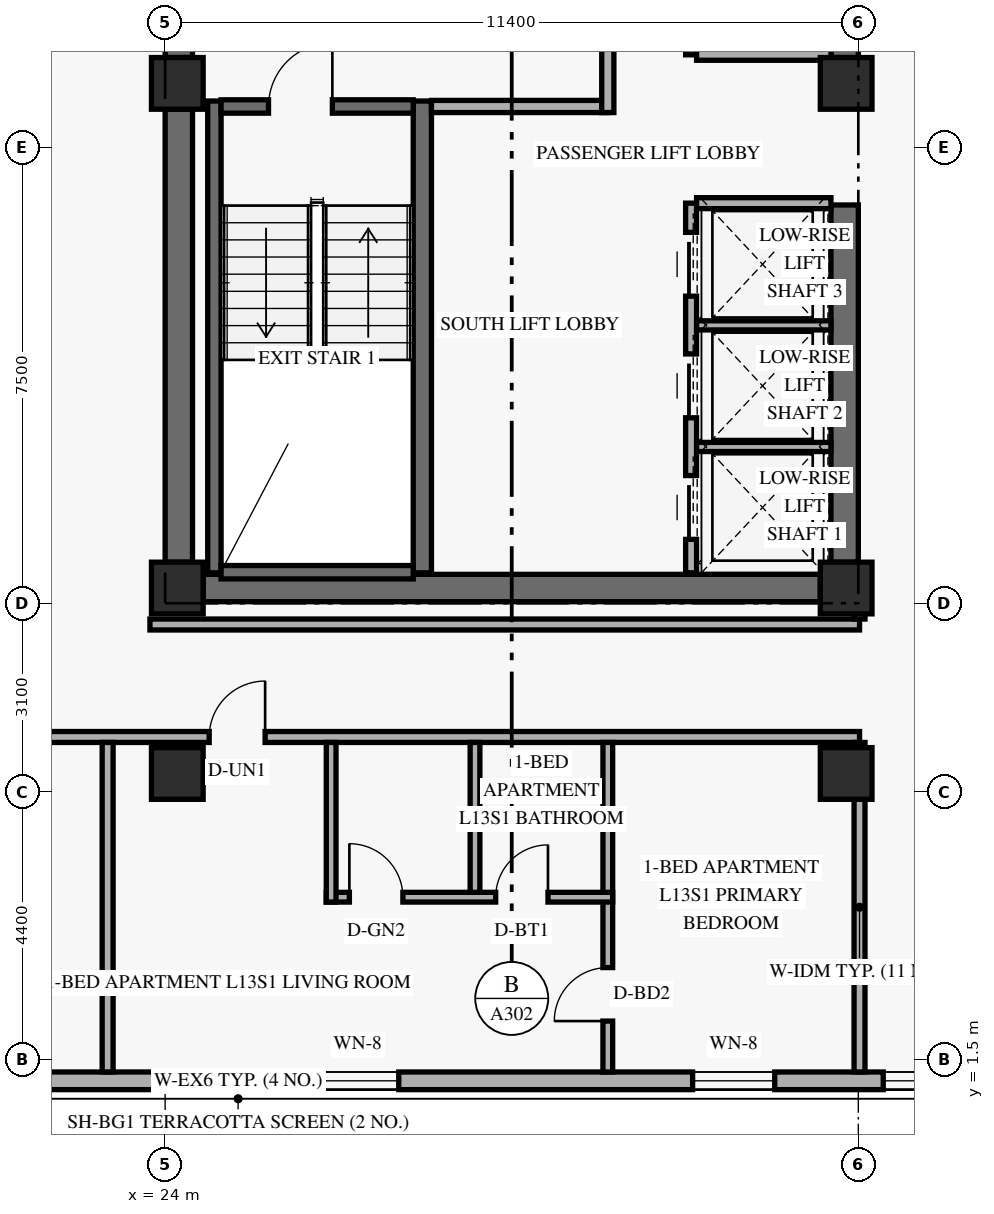
"""IFC4 building model, lengths in metres.
Left out: names, types, materials, properties, quantities, classifications, styles, units other than length and angle.
Written with IfcOpenShell. Run it as: python <this file> out.ifc"""

import sys

from ifc_helpers import new_model, si_unit, direction, frame, frame_2d, origin, origin_2d, place, context, subcontext, project, spatial, rectangle, extrude, element, fill, save


model = new_model("IFC4")
c1 = context("Model", 3, precision=1e-05, world=origin(), true_north=direction((0.0, 1.0)))
c2 = subcontext(c1, "Body", "Model", "MODEL_VIEW")
j1 = project(units=[si_unit("LENGTHUNIT", "METRE"), si_unit("PLANEANGLEUNIT", "RADIAN")], contexts=[c1])
p1 = place(None, origin())
s1 = spatial("IfcSite", under=j1, at=p1, CompositionType="ELEMENT")
p2 = place(p1, origin())
s2 = spatial("IfcBuilding", under=s1, at=p2, CompositionType="ELEMENT")
p3 = place(p2, frame((0.0, 0.0, 52.8)))
s3 = spatial("IfcBuildingStorey", under=s2, at=p3, CompositionType="ELEMENT", Elevation=52.8)
p4 = place(p3, frame((24.225, 9.675, 0.0), z_axis=(0.0, 0.0, 1.0), x_axis=(0.0, 1.0, 0.0)))
e1 = element("IfcWall", 1, at=p4, inside=s3, PredefinedType="SHEAR", context=c2, shape_type="SweptSolid", body=[
    extrude(rectangle(XDim=7.45, YDim=0.45, at=frame_2d((3.725, 0.0))), origin(), (0.0, 0.0, 1.0), 2.667),
])
p5 = place(p3, frame((24.225, 17.975, 0.0), z_axis=(0.0, 0.0, 1.0), x_axis=(0.0, 1.0, 0.0)))
e2 = element("IfcWall", 2, at=p5, inside=s3, PredefinedType="SHEAR", context=c2, shape_type="SweptSolid", body=[
    extrude(rectangle(XDim=11.8, YDim=0.45, at=frame_2d((5.9, 0.0))), origin(), (0.0, 0.0, 1.0), 2.667),
])
p6 = place(p3, frame((35.175, 9.675, 0.0), z_axis=(0.0, 0.0, 1.0), x_axis=(0.0, 1.0, 0.0)))
e3 = element("IfcWall", 3, at=p6, inside=s3, PredefinedType="SHEAR", context=c2, shape_type="SweptSolid", body=[
    extrude(rectangle(XDim=5.875, YDim=0.45, at=frame_2d((2.938, 0.0))), origin(), (0.0, 0.0, 1.0), 2.667),
])
p7 = place(p3, frame((35.175, 17.975, 0.0), z_axis=(0.0, 0.0, 1.0), x_axis=(0.0, 1.0, 0.0)))
e4 = element("IfcWall", 4, at=p7, inside=s3, PredefinedType="SHEAR", context=c2, shape_type="SweptSolid", body=[
    extrude(rectangle(XDim=10.125, YDim=0.45, at=frame_2d((5.062, 0.0))), origin(), (0.0, 0.0, 1.0), 2.667),
])
p8 = place(p3, frame((24.625, 9.25, 0.0), z_axis=(0.0, 0.0, 1.0), x_axis=(1.0, 0.0, 0.0)))
e5 = element("IfcWall", 5, at=p8, inside=s3, PredefinedType="SHEAR", context=c2, shape_type="SweptSolid", body=[
    extrude(rectangle(XDim=10.15, YDim=0.45, at=frame_2d((5.075, 0.0))), origin(), (0.0, 0.0, 1.0), 3.36),
])
p9 = place(p3, frame((24.81, 9.5, 0.0), z_axis=(0.0, 0.0, 1.0), x_axis=(0.0, 1.0, 0.0)))
e6 = element("IfcWall", 6, at=p9, inside=s3, PredefinedType="SHEAR", context=c2, shape_type="SweptSolid", body=[
    extrude(rectangle(XDim=7.76, YDim=0.22, at=frame_2d((3.88, 0.0))), origin(), (0.0, 0.0, 1.0), 3.36),
])
p10 = place(p3, frame((28.23, 9.5, 0.0), z_axis=(0.0, 0.0, 1.0), x_axis=(0.0, 1.0, 0.0)))
e7 = element("IfcWall", 7, at=p10, inside=s3, PredefinedType="SHEAR", context=c2, shape_type="SweptSolid", body=[
    extrude(rectangle(XDim=7.76, YDim=0.3, at=frame_2d((3.88, 0.0))), origin(), (0.0, 0.0, 1.0), 3.36),
])
p11 = place(p3, frame((24.92, 9.51, 0.0), z_axis=(0.0, 0.0, 1.0), x_axis=(1.0, 0.0, 0.0)))
e8 = element("IfcWall", 8, at=p11, inside=s3, PredefinedType="SHEAR", context=c2, shape_type="SweptSolid", body=[
    extrude(rectangle(XDim=3.16, YDim=0.22, at=frame_2d((1.58, 0.0))), origin(), (0.0, 0.0, 1.0), 3.36),
])
p12 = place(p3, frame((24.92, 17.17, 0.0), z_axis=(0.0, 0.0, 1.0), x_axis=(1.0, 0.0, 0.0)))
e9 = element("IfcWall", 9, at=p12, inside=s3, PredefinedType="SHEAR", context=c2, shape_type="SweptSolid", body=[
    extrude(rectangle(XDim=3.16, YDim=0.22, at=frame_2d((1.58, 0.0))), origin(), (0.0, 0.0, 1.0), 3.36),
])
p13 = place(p12, frame((0.78, 0.0, 0.0)))
e10 = element("IfcOpeningElement", 10, at=p13, cuts=e9, PredefinedType="OPENING", context=c2, shape_type="SweptSolid", body=[
    extrude(rectangle(XDim=1.05, YDim=2.15, at=frame_2d((0.525, 1.075))), frame((0.0, 0.12, 0.0), z_axis=(0.0, -1.0, 0.0), x_axis=(1.0, 0.0, 0.0)), (0.0, 0.0, 1.0), 0.24),
])
for number, where, z_axis, x_axis in (
    (11, (24.2, 6.2, 0.0), (0.0, 0.0, 1.0), (1.0, 0.0, 0.0)),
    (12, (24.2, 9.25, 0.0), (0.0, 0.0, 1.0), (1.0, 0.0, 0.0)),
    (13, (24.2, 17.55, 0.0), (0.0, 0.0, 1.0), (1.0, 0.0, 0.0)),
    (14, (35.2, 6.2, 0.0), (0.0, 0.0, 1.0), (1.0, 0.0, 0.0)),
    (15, (35.2, 9.25, 0.0), (0.0, 0.0, 1.0), (1.0, 0.0, 0.0)),
    (16, (35.2, 17.55, 0.0), (0.0, 0.0, 1.0), (1.0, 0.0, 0.0)),
):
    element("IfcColumn", number, at=place(p3, frame(where, z_axis=z_axis, x_axis=x_axis)), inside=s3, PredefinedType="COLUMN", context=c2, shape_type="SweptSolid", body=[
        extrude(rectangle(XDim=0.85, YDim=0.85, at=origin_2d()), origin(), (0.0, 0.0, 1.0), 3.6),
    ])
p14 = place(p3, frame((5.42, 1.145, 0.0), z_axis=(0.0, 0.0, 1.0), x_axis=(1.0, 0.0, 0.0)))
e17 = element("IfcWall", 17, at=p14, inside=s3, PredefinedType="SOLIDWALL", context=c2, shape_type="SweptSolid", body=[
    extrude(rectangle(XDim=39.56, YDim=0.29, at=frame_2d((19.78, 0.0))), origin(), (0.0, 0.0, 1.0), 3.36),
])
p15 = place(p14, frame((2.765, 0.0, 0.85)))
e18 = element("IfcOpeningElement", 18, at=p15, cuts=e17, PredefinedType="OPENING", context=c2, shape_type="SweptSolid", body=[
    extrude(rectangle(XDim=1.35, YDim=1.55, at=frame_2d((0.675, 0.775))), frame((0.0, 0.155, 0.0), z_axis=(0.0, -1.0, 0.0), x_axis=(1.0, 0.0, 0.0)), (0.0, 0.0, 1.0), 0.31),
])
p16 = place(p14, frame((7.18, 0.0, 0.85)))
e19 = element("IfcOpeningElement", 19, at=p16, cuts=e17, PredefinedType="OPENING", context=c2, shape_type="SweptSolid", body=[
    extrude(rectangle(XDim=1.2, YDim=1.5, at=frame_2d((0.6, 0.75))), frame((0.0, 0.155, 0.0), z_axis=(0.0, -1.0, 0.0), x_axis=(1.0, 0.0, 0.0)), (0.0, 0.0, 1.0), 0.31),
])
p17 = place(p14, frame((12.482, 0.0, 0.85)))
e20 = element("IfcOpeningElement", 20, at=p17, cuts=e17, PredefinedType="OPENING", context=c2, shape_type="SweptSolid", body=[
    extrude(rectangle(XDim=1.35, YDim=1.55, at=frame_2d((0.675, 0.775))), frame((0.0, 0.155, 0.0), z_axis=(0.0, -1.0, 0.0), x_axis=(1.0, 0.0, 0.0)), (0.0, 0.0, 1.0), 0.31),
])
p18 = place(p14, frame((21.072, 0.0, 0.85)))
e21 = element("IfcOpeningElement", 21, at=p18, cuts=e17, PredefinedType="OPENING", context=c2, shape_type="SweptSolid", body=[
    extrude(rectangle(XDim=1.35, YDim=1.55, at=frame_2d((0.675, 0.775))), frame((0.0, 0.155, 0.0), z_axis=(0.0, -1.0, 0.0), x_axis=(1.0, 0.0, 0.0)), (0.0, 0.0, 1.0), 0.31),
])
p19 = place(p14, frame((27.255, 0.0, 0.85)))
e22 = element("IfcOpeningElement", 22, at=p19, cuts=e17, PredefinedType="OPENING", context=c2, shape_type="SweptSolid", body=[
    extrude(rectangle(XDim=1.35, YDim=1.55, at=frame_2d((0.675, 0.775))), frame((0.0, 0.155, 0.0), z_axis=(0.0, -1.0, 0.0), x_axis=(1.0, 0.0, 0.0)), (0.0, 0.0, 1.0), 0.31),
])
p20 = place(p14, frame((30.39, 0.0, 0.85)))
e23 = element("IfcOpeningElement", 23, at=p20, cuts=e17, PredefinedType="OPENING", context=c2, shape_type="SweptSolid", body=[
    extrude(rectangle(XDim=1.35, YDim=1.55, at=frame_2d((0.675, 0.775))), frame((0.0, 0.155, 0.0), z_axis=(0.0, -1.0, 0.0), x_axis=(1.0, 0.0, 0.0)), (0.0, 0.0, 1.0), 0.31),
])
p21 = place(p14, frame((35.17, 0.0, 0.85)))
e24 = element("IfcOpeningElement", 24, at=p21, cuts=e17, PredefinedType="OPENING", context=c2, shape_type="SweptSolid", body=[
    extrude(rectangle(XDim=1.35, YDim=1.55, at=frame_2d((0.675, 0.775))), frame((0.0, 0.155, 0.0), z_axis=(0.0, -1.0, 0.0), x_axis=(1.0, 0.0, 0.0)), (0.0, 0.0, 1.0), 0.31),
])
p22 = place(p3, frame((28.38, 17.17, 0.0), z_axis=(0.0, 0.0, 1.0), x_axis=(1.0, 0.0, 0.0)))
e25 = element("IfcWall", 25, at=p22, inside=s3, PredefinedType="STANDARD", context=c2, shape_type="SweptSolid", body=[
    extrude(rectangle(XDim=2.9, YDim=0.2, at=frame_2d((1.45, 0.0))), origin(), (0.0, 0.0, 1.0), 3.36),
])
p23 = place(p3, frame((31.28, 17.07, 0.0), z_axis=(0.0, 0.0, 1.0), x_axis=(0.0, 1.0, 0.0)))
e26 = element("IfcWall", 26, at=p23, inside=s3, PredefinedType="STANDARD", context=c2, shape_type="SweptSolid", body=[
    extrude(rectangle(XDim=3.92, YDim=0.2, at=frame_2d((1.96, 0.0))), origin(), (0.0, 0.0, 1.0), 2.649),
])
p24 = place(p23, frame((1.35, 0.0, 0.0)))
e27 = element("IfcOpeningElement", 27, at=p24, cuts=e26, PredefinedType="OPENING", context=c2, shape_type="SweptSolid", body=[
    extrude(rectangle(XDim=1.2, YDim=2.15, at=frame_2d((0.6, 1.075))), frame((0.0, 0.11, 0.0), z_axis=(0.0, -1.0, 0.0), x_axis=(1.0, 0.0, 0.0)), (0.0, 0.0, 1.0), 0.22),
])
p25 = place(p3, frame((32.65, 9.5, 0.0), z_axis=(0.0, 0.0, 1.0), x_axis=(0.0, 1.0, 0.0)))
e28 = element("IfcWall", 28, at=p25, inside=s3, PredefinedType="STANDARD", context=c2, shape_type="SweptSolid", body=[
    extrude(rectangle(XDim=6.08, YDim=0.18, at=frame_2d((3.04, 0.0))), origin(), (0.0, 0.0, 1.0), 3.36),
])
p26 = place(p25, frame((0.55, 0.0, 0.0)))
e29 = element("IfcOpeningElement", 29, at=p26, cuts=e28, PredefinedType="OPENING", context=c2, shape_type="SweptSolid", body=[
    extrude(rectangle(XDim=1.05, YDim=2.2, at=frame_2d((0.525, 1.1))), frame((0.0, 0.1, 0.0), z_axis=(0.0, -1.0, 0.0), x_axis=(1.0, 0.0, 0.0)), (0.0, 0.0, 1.0), 0.2),
])
p27 = place(p25, frame((2.55, 0.0, 0.0)))
e30 = element("IfcOpeningElement", 30, at=p27, cuts=e28, PredefinedType="OPENING", context=c2, shape_type="SweptSolid", body=[
    extrude(rectangle(XDim=1.05, YDim=2.2, at=frame_2d((0.525, 1.1))), frame((0.0, 0.1, 0.0), z_axis=(0.0, -1.0, 0.0), x_axis=(1.0, 0.0, 0.0)), (0.0, 0.0, 1.0), 0.2),
])
p28 = place(p25, frame((4.55, 0.0, 0.0)))
e31 = element("IfcOpeningElement", 31, at=p28, cuts=e28, PredefinedType="OPENING", context=c2, shape_type="SweptSolid", body=[
    extrude(rectangle(XDim=1.05, YDim=2.2, at=frame_2d((0.525, 1.1))), frame((0.0, 0.1, 0.0), z_axis=(0.0, -1.0, 0.0), x_axis=(1.0, 0.0, 0.0)), (0.0, 0.0, 1.0), 0.2),
])
p29 = place(p3, frame((32.74, 15.58, 0.0), z_axis=(0.0, 0.0, 1.0), x_axis=(1.0, 0.0, 0.0)))
e32 = element("IfcWall", 32, at=p29, inside=s3, PredefinedType="STANDARD", context=c2, shape_type="SweptSolid", body=[
    extrude(rectangle(XDim=2.21, YDim=0.18, at=frame_2d((1.105, 0.0))), origin(), (0.0, 0.0, 1.0), 3.36),
])
for number, where, z_axis, x_axis in (
    (33, (32.74, 11.57, 0.0), (0.0, 0.0, 1.0), (1.0, 0.0, 0.0)),
    (34, (32.74, 13.57, 0.0), (0.0, 0.0, 1.0), (1.0, 0.0, 0.0)),
):
    element("IfcWall", number, at=place(p3, frame(where, z_axis=z_axis, x_axis=x_axis)), inside=s3, PredefinedType="STANDARD", context=c2, shape_type="SweptSolid", body=[
        extrude(rectangle(XDim=2.21, YDim=0.15, at=frame_2d((1.105, 0.0))), origin(), (0.0, 0.0, 1.0), 3.36),
    ])
p30 = place(p3, frame((32.65, 18.02, 0.0), z_axis=(0.0, 0.0, 1.0), x_axis=(0.0, 1.0, 0.0)))
e35 = element("IfcWall", 35, at=p30, inside=s3, PredefinedType="STANDARD", context=c2, shape_type="SweptSolid", body=[
    extrude(rectangle(XDim=10.06, YDim=0.18, at=frame_2d((5.03, 0.0))), origin(), (0.0, 0.0, 1.0), 3.36),
])
p31 = place(p3, frame((32.74, 18.02, 0.0), z_axis=(0.0, 0.0, 1.0), x_axis=(1.0, 0.0, 0.0)))
e36 = element("IfcWall", 36, at=p31, inside=s3, PredefinedType="STANDARD", context=c2, shape_type="SweptSolid", body=[
    extrude(rectangle(XDim=2.21, YDim=0.18, at=frame_2d((1.105, 0.0))), origin(), (0.0, 0.0, 1.0), 3.36),
])
p32 = place(p3, frame((14.1, 6.8, 0.0), z_axis=(0.0, 0.0, 1.0), x_axis=(1.0, 0.0, 0.0)))
e37 = element("IfcWall", 37, at=p32, inside=s3, PredefinedType="STANDARD", context=c2, shape_type="SweptSolid", body=[
    extrude(rectangle(XDim=21.32, YDim=0.18, at=frame_2d((10.66, 0.0))), origin(), (0.0, 0.0, 1.0), 2.649),
])
p33 = place(p32, frame((1.5, 0.0, 0.0)))
e38 = element("IfcOpeningElement", 38, at=p33, cuts=e37, PredefinedType="OPENING", context=c2, shape_type="SweptSolid", body=[
    extrude(rectangle(XDim=0.95, YDim=2.15, at=frame_2d((0.475, 1.075))), frame((0.0, 0.1, 0.0), z_axis=(0.0, -1.0, 0.0), x_axis=(1.0, 0.0, 0.0)), (0.0, 0.0, 1.0), 0.2),
])
p34 = place(p32, frame((10.625, 0.0, 0.0)))
e39 = element("IfcOpeningElement", 39, at=p34, cuts=e37, PredefinedType="OPENING", context=c2, shape_type="SweptSolid", body=[
    extrude(rectangle(XDim=0.92, YDim=2.15, at=frame_2d((0.46, 1.075))), frame((0.0, 0.1, 0.0), z_axis=(0.0, -1.0, 0.0), x_axis=(1.0, 0.0, 0.0)), (0.0, 0.0, 1.0), 0.2),
])
p35 = place(p3, frame((23.75, 8.65, 0.0), z_axis=(0.0, 0.0, 1.0), x_axis=(1.0, 0.0, 0.0)))
e40 = element("IfcWall", 40, at=p35, inside=s3, PredefinedType="STANDARD", context=c2, shape_type="SweptSolid", body=[
    extrude(rectangle(XDim=11.67, YDim=0.18, at=frame_2d((5.835, 0.0))), origin(), (0.0, 0.0, 1.0), 2.649),
])
p36 = place(p3, frame((35.42, 1.29, 0.0), z_axis=(0.0, 0.0, 1.0), x_axis=(0.0, 1.0, 0.0)))
e41 = element("IfcWall", 41, at=p36, inside=s3, PredefinedType="PARTITIONING", context=c2, shape_type="SweptSolid", body=[
    extrude(rectangle(XDim=5.42, YDim=0.18, at=frame_2d((2.71, 0.0))), origin(), (0.0, 0.0, 1.0), 3.36),
])
p37 = place(p3, frame((35.42, 8.74, 0.0), z_axis=(0.0, 0.0, 1.0), x_axis=(0.0, 1.0, 0.0)))
e42 = element("IfcWall", 42, at=p37, inside=s3, PredefinedType="STANDARD", context=c2, shape_type="SweptSolid", body=[
    extrude(rectangle(XDim=0.51, YDim=0.18, at=frame_2d((0.255, 0.0))), origin(), (0.0, 0.0, 1.0), 3.36),
])
p38 = place(p3, frame((23.054, 1.29, 0.0), z_axis=(0.0, 0.0, 1.0), x_axis=(0.0, 1.0, 0.0)))
e43 = element("IfcWall", 43, at=p38, inside=s3, PredefinedType="PARTITIONING", context=c2, shape_type="SweptSolid", body=[
    extrude(rectangle(XDim=5.42, YDim=0.18, at=frame_2d((2.71, 0.0))), origin(), (0.0, 0.0, 1.0), 2.809),
])
p39 = place(p3, frame((31.28, 1.29, 0.0), z_axis=(0.0, 0.0, 1.0), x_axis=(0.0, 1.0, 0.0)))
e44 = element("IfcWall", 44, at=p39, inside=s3, PredefinedType="PARTITIONING", context=c2, shape_type="SweptSolid", body=[
    extrude(rectangle(XDim=5.42, YDim=0.16, at=frame_2d((2.71, 0.0))), origin(), (0.0, 0.0, 1.0), 2.809),
])
p40 = place(p39, frame((0.837, 0.0, 0.0)))
e45 = element("IfcOpeningElement", 45, at=p40, cuts=e44, PredefinedType="OPENING", context=c2, shape_type="SweptSolid", body=[
    extrude(rectangle(XDim=0.88, YDim=2.14, at=frame_2d((0.44, 1.07))), frame((0.0, 0.09, 0.0), z_axis=(0.0, -1.0, 0.0), x_axis=(1.0, 0.0, 0.0)), (0.0, 0.0, 1.0), 0.18),
])
p41 = place(p3, frame((26.65, 4.165, 0.0), z_axis=(0.0, 0.0, 1.0), x_axis=(1.0, 0.0, 0.0)))
e46 = element("IfcWall", 46, at=p41, inside=s3, PredefinedType="PLUMBINGWALL", context=c2, shape_type="SweptSolid", body=[
    extrude(rectangle(XDim=4.71, YDim=0.16, at=frame_2d((2.355, 0.0))), origin(), (0.0, 0.0, 1.0), 3.36),
])
p42 = place(p41, frame((0.38, 0.0, 0.0)))
e47 = element("IfcOpeningElement", 47, at=p42, cuts=e46, PredefinedType="OPENING", context=c2, shape_type="SweptSolid", body=[
    extrude(rectangle(XDim=0.88, YDim=2.12, at=frame_2d((0.44, 1.06))), frame((0.0, 0.09, 0.0), z_axis=(0.0, -1.0, 0.0), x_axis=(1.0, 0.0, 0.0)), (0.0, 0.0, 1.0), 0.18),
])
p43 = place(p41, frame((2.786, 0.0, 0.0)))
e48 = element("IfcOpeningElement", 48, at=p43, cuts=e46, PredefinedType="OPENING", context=c2, shape_type="SweptSolid", body=[
    extrude(rectangle(XDim=0.86, YDim=2.12, at=frame_2d((0.43, 1.06))), frame((0.0, 0.09, 0.0), z_axis=(0.0, -1.0, 0.0), x_axis=(1.0, 0.0, 0.0)), (0.0, 0.0, 1.0), 0.18),
])
p44 = place(p3, frame((26.73, 4.085, 0.0), z_axis=(0.0, 0.0, 1.0), x_axis=(0.0, 1.0, 0.0)))
e49 = element("IfcWall", 49, at=p44, inside=s3, PredefinedType="PLUMBINGWALL", context=c2, shape_type="SweptSolid", body=[
    extrude(rectangle(XDim=2.625, YDim=0.16, at=frame_2d((1.312, 0.0))), origin(), (0.0, 0.0, 1.0), 2.809),
])
p45 = place(p3, frame((29.096, 4.245, 0.0), z_axis=(0.0, 0.0, 1.0), x_axis=(0.0, 1.0, 0.0)))
e50 = element("IfcWall", 50, at=p45, inside=s3, PredefinedType="PLUMBINGWALL", context=c2, shape_type="SweptSolid", body=[
    extrude(rectangle(XDim=2.465, YDim=0.16, at=frame_2d((1.232, 0.0))), origin(), (0.0, 0.0, 1.0), 2.809),
])
p46 = place(p18, origin())
e51 = element("IfcWindow", 51, at=p46, inside=s3, PartitioningType="SINGLE_PANEL", PredefinedType="WINDOW", context=c2, shape_type="SweptSolid", body=[
    extrude(rectangle(XDim=1.35, YDim=1.55, at=frame_2d((0.675, 0.775))), frame((0.0, 0.03, 0.0), z_axis=(0.0, -1.0, 0.0), x_axis=(1.0, 0.0, 0.0)), (0.0, 0.0, 1.0), 0.06),
])
fill(e21, e51)
p47 = place(p19, origin())
e52 = element("IfcWindow", 52, at=p47, inside=s3, PartitioningType="SINGLE_PANEL", PredefinedType="WINDOW", context=c2, shape_type="SweptSolid", body=[
    extrude(rectangle(XDim=1.35, YDim=1.55, at=frame_2d((0.675, 0.775))), frame((0.0, 0.03, 0.0), z_axis=(0.0, -1.0, 0.0), x_axis=(1.0, 0.0, 0.0)), (0.0, 0.0, 1.0), 0.06),
])
fill(e22, e52)
p48 = place(p20, origin())
e53 = element("IfcWindow", 53, at=p48, inside=s3, PartitioningType="SINGLE_PANEL", PredefinedType="WINDOW", context=c2, shape_type="SweptSolid", body=[
    extrude(rectangle(XDim=1.35, YDim=1.55, at=frame_2d((0.675, 0.775))), frame((0.0, 0.03, 0.0), z_axis=(0.0, -1.0, 0.0), x_axis=(1.0, 0.0, 0.0)), (0.0, 0.0, 1.0), 0.06),
])
fill(e23, e53)
p49 = place(p13, frame((1.05, 0.0, 0.0), z_axis=(0.0, 0.0, 1.0), x_axis=(-1.0, 0.0, 0.0)))
e54 = element("IfcDoor", 54, at=p49, inside=s3, OperationType="SINGLE_SWING_LEFT", PredefinedType="DOOR", context=c2, shape_type="SweptSolid", body=[
    extrude(rectangle(XDim=1.05, YDim=2.15, at=frame_2d((0.525, 1.075))), frame((0.0, 0.025, 0.0), z_axis=(0.0, -1.0, 0.0), x_axis=(1.0, 0.0, 0.0)), (0.0, 0.0, 1.0), 0.05),
])
fill(e10, e54)
p50 = place(p26, origin())
e55 = element("IfcDoor", 55, at=p50, inside=s3, OperationType="SLIDING_TO_LEFT", PredefinedType="DOOR", context=c2, shape_type="SweptSolid", body=[
    extrude(rectangle(XDim=1.05, YDim=2.2, at=frame_2d((0.525, 1.1))), frame((0.0, 0.025, 0.0), z_axis=(0.0, -1.0, 0.0), x_axis=(1.0, 0.0, 0.0)), (0.0, 0.0, 1.0), 0.05),
])
fill(e29, e55)
p51 = place(p27, origin())
e56 = element("IfcDoor", 56, at=p51, inside=s3, OperationType="SLIDING_TO_LEFT", PredefinedType="DOOR", context=c2, shape_type="SweptSolid", body=[
    extrude(rectangle(XDim=1.05, YDim=2.2, at=frame_2d((0.525, 1.1))), frame((0.0, 0.025, 0.0), z_axis=(0.0, -1.0, 0.0), x_axis=(1.0, 0.0, 0.0)), (0.0, 0.0, 1.0), 0.05),
])
fill(e30, e56)
p52 = place(p28, origin())
e57 = element("IfcDoor", 57, at=p52, inside=s3, OperationType="SLIDING_TO_LEFT", PredefinedType="DOOR", context=c2, shape_type="SweptSolid", body=[
    extrude(rectangle(XDim=1.05, YDim=2.2, at=frame_2d((0.525, 1.1))), frame((0.0, 0.025, 0.0), z_axis=(0.0, -1.0, 0.0), x_axis=(1.0, 0.0, 0.0)), (0.0, 0.0, 1.0), 0.05),
])
fill(e31, e57)
p53 = place(p34, origin())
e58 = element("IfcDoor", 58, at=p53, inside=s3, OperationType="SINGLE_SWING_RIGHT", PredefinedType="DOOR", context=c2, shape_type="SweptSolid", body=[
    extrude(rectangle(XDim=0.92, YDim=2.15, at=frame_2d((0.46, 1.075))), frame((0.0, 0.025, 0.0), z_axis=(0.0, -1.0, 0.0), x_axis=(1.0, 0.0, 0.0)), (0.0, 0.0, 1.0), 0.05),
])
fill(e39, e58)
p54 = place(p42, origin())
e59 = element("IfcDoor", 59, at=p54, inside=s3, OperationType="SINGLE_SWING_LEFT", PredefinedType="DOOR", context=c2, shape_type="SweptSolid", body=[
    extrude(rectangle(XDim=0.88, YDim=2.12, at=frame_2d((0.44, 1.06))), frame((0.0, 0.025, 0.0), z_axis=(0.0, -1.0, 0.0), x_axis=(1.0, 0.0, 0.0)), (0.0, 0.0, 1.0), 0.05),
])
fill(e47, e59)
p55 = place(p43, origin())
e60 = element("IfcDoor", 60, at=p55, inside=s3, OperationType="SINGLE_SWING_RIGHT", PredefinedType="DOOR", context=c2, shape_type="SweptSolid", body=[
    extrude(rectangle(XDim=0.86, YDim=2.12, at=frame_2d((0.43, 1.06))), frame((0.0, 0.025, 0.0), z_axis=(0.0, -1.0, 0.0), x_axis=(1.0, 0.0, 0.0)), (0.0, 0.0, 1.0), 0.05),
])
fill(e48, e60)
p56 = place(p40, origin())
e61 = element("IfcDoor", 61, at=p56, inside=s3, OperationType="SINGLE_SWING_LEFT", PredefinedType="DOOR", context=c2, shape_type="SweptSolid", body=[
    extrude(rectangle(XDim=0.88, YDim=2.14, at=frame_2d((0.44, 1.07))), frame((0.0, 0.025, 0.0), z_axis=(0.0, -1.0, 0.0), x_axis=(1.0, 0.0, 0.0)), (0.0, 0.0, 1.0), 0.05),
])
fill(e45, e61)
save(model, sys.argv[1])
